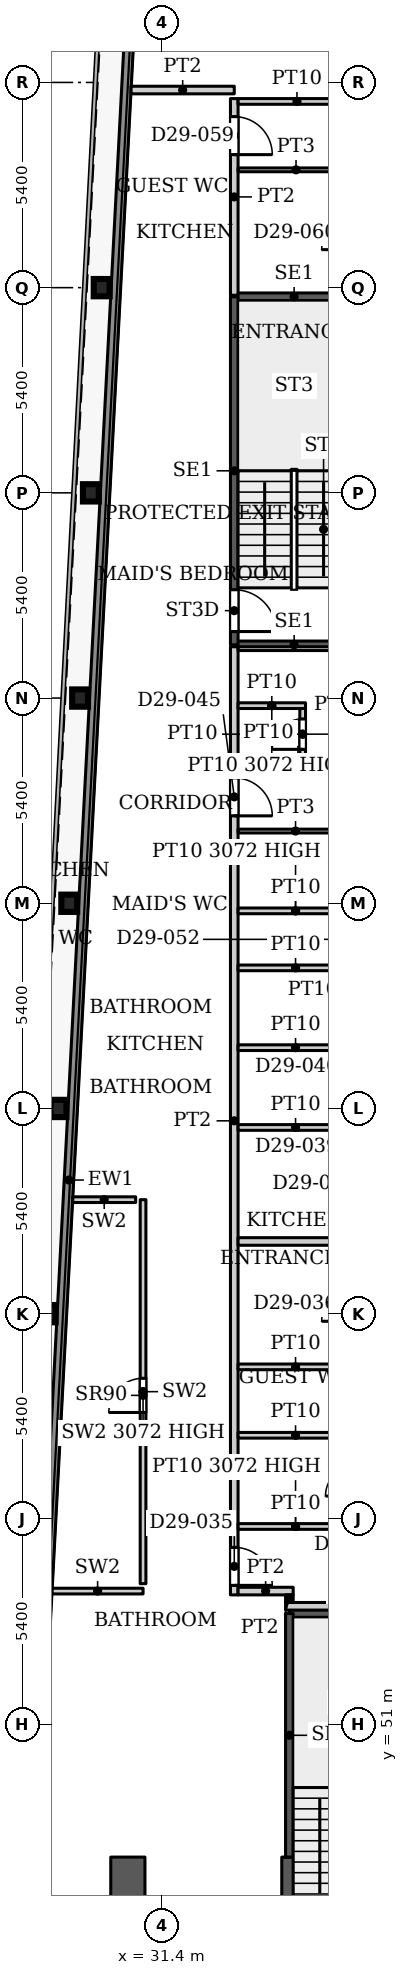
"""IFC4 building model, lengths in metres.
Left out: names, types, materials, properties, quantities, classifications, styles, units other than length and angle.
Written with IfcOpenShell. Run it as: python <this file> out.ifc"""

import sys

from ifc_helpers import new_model, si_unit, direction, frame, frame_2d, origin, origin_2d, place, context, subcontext, project, spatial, rectangle, i_section, extrude, source, transform, mapped, element, fill, save


model = new_model("IFC4")
c1 = context("Model", 3, precision=1e-05, world=origin(), true_north=direction((0.0, 1.0)))
c2 = subcontext(c1, "Body", "Model", "MODEL_VIEW")
j1 = project(units=[si_unit("LENGTHUNIT", "METRE"), si_unit("PLANEANGLEUNIT", "RADIAN")], contexts=[c1])
p1 = place(None, origin())
s1 = spatial("IfcSite", under=j1, at=p1, CompositionType="ELEMENT")
p2 = place(p1, origin())
s2 = spatial("IfcBuilding", under=s1, at=p2, CompositionType="ELEMENT")
p3 = place(p2, frame((0.0, 0.0, 125.3)))
s3 = spatial("IfcBuildingStorey", under=s2, at=p3, CompositionType="ELEMENT", Elevation=125.3)
for number, where, z_axis, x_axis in (
    (1, (28.39, 61.8, 0.0), (0.0, 0.0, 1.0), (1.0, 0.0, 0.0)),
    (2, (28.674, 67.2, 0.0), (0.0, 0.0, 1.0), (1.0, 0.0, 0.0)),
    (3, (28.958, 72.6, 0.0), (0.0, 0.0, 1.0), (1.0, 0.0, 0.0)),
    (4, (29.243, 78.0, 0.0), (0.0, 0.0, 1.0), (1.0, 0.0, 0.0)),
    (5, (29.527, 83.4, 0.0), (0.0, 0.0, 1.0), (1.0, 0.0, 0.0)),
    (6, (29.811, 88.8, 0.0), (0.0, 0.0, 1.0), (1.0, 0.0, 0.0)),
):
    element("IfcColumn", number, at=place(p3, frame(where, z_axis=z_axis, x_axis=x_axis)), inside=s3, PredefinedType="COLUMN", context=c2, shape_type="SweptSolid", body=[
        extrude(i_section(OverallWidth=0.418, OverallDepth=0.455, WebThickness=0.042, FlangeThickness=0.068, FilletRadius=0.014, at=origin_2d()), origin(), (0.0, 0.0, 1.0), 3.9),
    ])
p4 = place(p3, frame((34.75, 29.05, 0.0), z_axis=(0.0, 0.0, 1.0), x_axis=(0.0, 1.0, 0.0)))
e7 = element("IfcWall", 7, at=p4, inside=s3, PredefinedType="SHEAR", context=c2, shape_type="SweptSolid", body=[
    extrude(rectangle(XDim=18.45, YDim=0.4, at=frame_2d((9.225, 0.0))), origin(), (0.0, 0.0, 1.0), 3.9),
])
p5 = place(p4, frame((8.025, 0.0, 0.0)))
e8 = element("IfcOpeningElement", 8, at=p5, cuts=e7, PredefinedType="OPENING", context=c2, shape_type="SweptSolid", body=[
    extrude(rectangle(XDim=1.1, YDim=2.2, at=frame_2d((0.55, 1.1))), frame((0.0, 0.21, 0.0), z_axis=(0.0, -1.0, 0.0), x_axis=(1.0, 0.0, 0.0)), (0.0, 0.0, 1.0), 0.42),
])
p6 = place(p4, frame((10.875, 0.0, 0.0)))
e9 = element("IfcOpeningElement", 9, at=p6, cuts=e7, PredefinedType="OPENING", context=c2, shape_type="SweptSolid", body=[
    extrude(rectangle(XDim=1.1, YDim=2.2, at=frame_2d((0.55, 1.1))), frame((0.0, 0.21, 0.0), z_axis=(0.0, -1.0, 0.0), x_axis=(1.0, 0.0, 0.0)), (0.0, 0.0, 1.0), 0.42),
])
p7 = place(p4, frame((13.725, 0.0, 0.0)))
e10 = element("IfcOpeningElement", 10, at=p7, cuts=e7, PredefinedType="OPENING", context=c2, shape_type="SweptSolid", body=[
    extrude(rectangle(XDim=1.1, YDim=2.2, at=frame_2d((0.55, 1.1))), frame((0.0, 0.21, 0.0), z_axis=(0.0, -1.0, 0.0), x_axis=(1.0, 0.0, 0.0)), (0.0, 0.0, 1.0), 0.42),
])
p8 = place(p4, frame((15.95, 0.0, 0.0)))
e11 = element("IfcOpeningElement", 11, at=p8, cuts=e7, PredefinedType="OPENING", context=c2, shape_type="SweptSolid", body=[
    extrude(rectangle(XDim=1.1, YDim=2.2, at=frame_2d((0.55, 1.1))), frame((0.0, 0.21, 0.0), z_axis=(0.0, -1.0, 0.0), x_axis=(1.0, 0.0, 0.0)), (0.0, 0.0, 1.0), 0.42),
])
p9 = place(p3, frame((30.5, 29.05, 0.0), z_axis=(0.0, 0.0, 1.0), x_axis=(0.0, 1.0, 0.0)))
e12 = element("IfcWall", 12, at=p9, inside=s3, PredefinedType="SHEAR", context=c2, shape_type="SweptSolid", body=[
    extrude(rectangle(XDim=18.45, YDim=0.9, at=frame_2d((9.225, 0.0))), origin(), (0.0, 0.0, 1.0), 3.9),
])
p10 = place(p9, frame((6.55, 0.0, 0.0)))
e13 = element("IfcOpeningElement", 13, at=p10, cuts=e12, PredefinedType="OPENING", context=c2, shape_type="SweptSolid", body=[
    extrude(rectangle(XDim=0.9, YDim=2.2, at=frame_2d((0.45, 1.1))), frame((0.0, 0.46, 0.0), z_axis=(0.0, -1.0, 0.0), x_axis=(1.0, 0.0, 0.0)), (0.0, 0.0, 1.0), 0.92),
])
p11 = place(p9, frame((11.025, 0.0, 0.0)))
e14 = element("IfcOpeningElement", 14, at=p11, cuts=e12, PredefinedType="OPENING", context=c2, shape_type="SweptSolid", body=[
    extrude(rectangle(XDim=0.9, YDim=2.2, at=frame_2d((0.45, 1.1))), frame((0.0, 0.46, 0.0), z_axis=(0.0, -1.0, 0.0), x_axis=(1.0, 0.0, 0.0)), (0.0, 0.0, 1.0), 0.92),
])
p12 = place(p3, frame((27.195, 31.969, 0.0), z_axis=(0.0, 0.0, 1.0), x_axis=(0.052554995867, 0.998618031286, 0.0)))
e15 = element("IfcWall", 15, at=p12, inside=s3, PredefinedType="SOLIDWALL", context=c2, shape_type="SweptSolid", body=[
    extrude(rectangle(XDim=66.787, YDim=0.25, at=frame_2d((33.394, 0.0))), origin(), (0.0, 0.0, 1.0), 3.75),
])
p13 = place(p3, frame((34.75, 53.91, 0.0), z_axis=(0.0, 0.0, 1.0), x_axis=(1.0, 0.0, 0.0)))
e16 = element("IfcWall", 16, at=p13, inside=s3, PredefinedType="SHEAR", context=c2, shape_type="SweptSolid", body=[
    extrude(rectangle(XDim=3.15, YDim=0.2, at=frame_2d((1.575, 0.0))), origin(), (0.0, 0.0, 1.0), 3.9),
])
p14 = place(p3, frame((34.75, 47.5, 0.0), z_axis=(0.0, 0.0, 1.0), x_axis=(0.0, 1.0, 0.0)))
e17 = element("IfcWall", 17, at=p14, inside=s3, PredefinedType="SHEAR", context=c2, shape_type="SweptSolid", body=[
    extrude(rectangle(XDim=6.41, YDim=0.2, at=frame_2d((3.205, 0.0))), origin(), (0.0, 0.0, 1.0), 3.9),
])
for number, where, z_axis, x_axis in (
    (18, (33.3, 79.4, 0.0), (0.0, 0.0, 1.0), (1.0, 0.0, 0.0)),
    (19, (33.3, 88.56, 0.0), (0.0, 0.0, 1.0), (1.0, 0.0, 0.0)),
):
    element("IfcWall", number, at=place(p3, frame(where, z_axis=z_axis, x_axis=x_axis)), inside=s3, PredefinedType="SHEAR", context=c2, shape_type="SweptSolid", body=[
        extrude(rectangle(XDim=3.15, YDim=0.2, at=frame_2d((1.575, 0.0))), origin(), (0.0, 0.0, 1.0), 3.9),
    ])
p15 = place(p3, frame((33.3, 79.4, 0.0), z_axis=(0.0, 0.0, 1.0), x_axis=(0.0, 1.0, 0.0)))
e20 = element("IfcWall", 20, at=p15, inside=s3, PredefinedType="SHEAR", context=c2, shape_type="SweptSolid", body=[
    extrude(rectangle(XDim=9.16, YDim=0.2, at=frame_2d((4.58, 0.0))), origin(), (0.0, 0.0, 1.0), 3.9),
])
p16 = place(p15, frame((0.35, 0.0, 0.0)))
e21 = element("IfcOpeningElement", 21, at=p16, cuts=e20, PredefinedType="OPENING", context=c2, shape_type="SweptSolid", body=[
    extrude(rectangle(XDim=1.1, YDim=2.2, at=frame_2d((0.55, 1.1))), frame((0.0, 0.11, 0.0), z_axis=(0.0, -1.0, 0.0), x_axis=(1.0, 0.0, 0.0)), (0.0, 0.0, 1.0), 0.22),
])
p17 = place(p3, frame((28.508, 54.5, 0.0), z_axis=(0.0, 0.0, 1.0), x_axis=(1.0, 0.0, 0.0)))
e22 = element("IfcWall", 22, at=p17, inside=s3, PredefinedType="PARTITIONING", context=c2, shape_type="SweptSolid", body=[
    extrude(rectangle(XDim=2.392, YDim=0.15, at=frame_2d((1.196, 0.0))), origin(), (0.0, 0.0, 1.0), 3.9),
])
p18 = place(p3, frame((30.9, 54.695, 0.0), z_axis=(0.0, 0.0, 1.0), x_axis=(0.0, 1.0, 0.0)))
e23 = element("IfcWall", 23, at=p18, inside=s3, PredefinedType="PARTITIONING", context=c2, shape_type="SweptSolid", body=[
    extrude(rectangle(XDim=10.105, YDim=0.15, at=frame_2d((5.052, 0.0))), origin(), (0.0, 0.0, 1.0), 3.072),
])
p19 = place(p18, frame((4.505, 0.0, 0.0)))
e24 = element("IfcOpeningElement", 24, at=p19, cuts=e23, PredefinedType="OPENING", context=c2, shape_type="SweptSolid", body=[
    extrude(rectangle(XDim=0.9, YDim=2.2, at=frame_2d((0.45, 1.1))), frame((0.0, 0.085, 0.0), z_axis=(0.0, -1.0, 0.0), x_axis=(1.0, 0.0, 0.0)), (0.0, 0.0, 1.0), 0.17),
])
p20 = place(p3, frame((29.05, 64.8, 0.0), z_axis=(0.0, 0.0, 1.0), x_axis=(1.0, 0.0, 0.0)))
e25 = element("IfcWall", 25, at=p20, inside=s3, PredefinedType="PARTITIONING", context=c2, shape_type="SweptSolid", body=[
    extrude(rectangle(XDim=1.655, YDim=0.15, at=frame_2d((0.828, 0.0))), origin(), (0.0, 0.0, 1.0), 3.9),
])
p21 = place(p3, frame((30.585, 94.0, 0.0), z_axis=(0.0, 0.0, 1.0), x_axis=(1.0, 0.0, 0.0)))
e26 = element("IfcWall", 26, at=p21, inside=s3, PredefinedType="PARTITIONING", context=c2, shape_type="SweptSolid", body=[
    extrude(rectangle(XDim=2.715, YDim=0.2, at=frame_2d((1.358, 0.0))), origin(), (0.0, 0.0, 1.0), 3.6),
])
p22 = place(p3, frame((33.3, 54.4, 0.0), z_axis=(0.0, 0.0, 1.0), x_axis=(0.0, 1.0, 0.0)))
e27 = element("IfcWall", 27, at=p22, inside=s3, PredefinedType="PARTITIONING", context=c2, shape_type="SweptSolid", body=[
    extrude(rectangle(XDim=24.95, YDim=0.2, at=frame_2d((12.475, 0.0))), origin(), (0.0, 0.0, 1.0), 3.6),
])
p23 = place(p22, frame((0.25, 0.0, 0.0)))
e28 = element("IfcOpeningElement", 28, at=p23, cuts=e27, PredefinedType="OPENING", context=c2, shape_type="SweptSolid", body=[
    extrude(rectangle(XDim=1.0, YDim=2.1, at=frame_2d((0.5, 1.05))), frame((0.0, 0.11, 0.0), z_axis=(0.0, -1.0, 0.0), x_axis=(1.0, 0.0, 0.0)), (0.0, 0.0, 1.0), 0.22),
])
p24 = place(p22, frame((20.5, 0.0, 0.0)))
e29 = element("IfcOpeningElement", 29, at=p24, cuts=e27, PredefinedType="OPENING", context=c2, shape_type="SweptSolid", body=[
    extrude(rectangle(XDim=1.0, YDim=2.1, at=frame_2d((0.5, 1.05))), frame((0.0, 0.11, 0.0), z_axis=(0.0, -1.0, 0.0), x_axis=(1.0, 0.0, 0.0)), (0.0, 0.0, 1.0), 0.22),
])
p25 = place(p3, frame((33.3, 88.6, 0.0), z_axis=(0.0, 0.0, 1.0), x_axis=(0.0, 1.0, 0.0)))
e30 = element("IfcWall", 30, at=p25, inside=s3, PredefinedType="PARTITIONING", context=c2, shape_type="SweptSolid", body=[
    extrude(rectangle(XDim=5.175, YDim=0.2, at=frame_2d((2.587, 0.0))), origin(), (0.0, 0.0, 1.0), 3.6),
])
p26 = place(p25, frame((3.7, 0.0, 0.0)))
e31 = element("IfcOpeningElement", 31, at=p26, cuts=e30, PredefinedType="OPENING", context=c2, shape_type="SweptSolid", body=[
    extrude(rectangle(XDim=1.0, YDim=2.1, at=frame_2d((0.5, 1.05))), frame((0.0, 0.11, 0.0), z_axis=(0.0, -1.0, 0.0), x_axis=(1.0, 0.0, 0.0)), (0.0, 0.0, 1.0), 0.22),
])
p27 = place(p3, frame((33.4, 54.5, 0.0), z_axis=(0.0, 0.0, 1.0), x_axis=(1.0, 0.0, 0.0)))
e32 = element("IfcWall", 32, at=p27, inside=s3, PredefinedType="PARTITIONING", context=c2, shape_type="SweptSolid", body=[
    extrude(rectangle(XDim=1.45, YDim=0.2, at=frame_2d((0.725, 0.0))), origin(), (0.0, 0.0, 1.0), 3.6),
])
p28 = place(p3, frame((33.4, 56.2, 0.0), z_axis=(0.0, 0.0, 1.0), x_axis=(1.0, 0.0, 0.0)))
e33 = element("IfcWall", 33, at=p28, inside=s3, PredefinedType="PARTITIONING", context=c2, shape_type="SweptSolid", body=[
    extrude(rectangle(XDim=3.025, YDim=0.15, at=frame_2d((1.513, 0.0))), origin(), (0.0, 0.0, 1.0), 3.072),
])
for number, where, z_axis, x_axis in (
    (34, (33.4, 58.6, 0.0), (0.0, 0.0, 1.0), (1.0, 0.0, 0.0)),
    (35, (33.4, 60.4, 0.0), (0.0, 0.0, 1.0), (1.0, 0.0, 0.0)),
):
    element("IfcWall", number, at=place(p3, frame(where, z_axis=z_axis, x_axis=x_axis)), inside=s3, PredefinedType="PARTITIONING", context=c2, shape_type="SweptSolid", body=[
        extrude(rectangle(XDim=3.025, YDim=0.15, at=frame_2d((1.513, 0.0))), origin(), (0.0, 0.0, 1.0), 3.6),
    ])
p29 = place(p3, frame((33.4, 63.7, 0.0), z_axis=(0.0, 0.0, 1.0), x_axis=(1.0, 0.0, 0.0)))
e36 = element("IfcWall", 36, at=p29, inside=s3, PredefinedType="PARTITIONING", context=c2, shape_type="SweptSolid", body=[
    extrude(rectangle(XDim=12.5, YDim=0.2, at=frame_2d((6.25, 0.0))), origin(), (0.0, 0.0, 1.0), 3.6),
])
for number, where, z_axis, x_axis in (
    (37, (33.4, 66.7, 0.0), (0.0, 0.0, 1.0), (1.0, 0.0, 0.0)),
    (38, (33.4, 68.8, 0.0), (0.0, 0.0, 1.0), (1.0, 0.0, 0.0)),
    (39, (33.4, 70.9, 0.0), (0.0, 0.0, 1.0), (1.0, 0.0, 0.0)),
):
    element("IfcWall", number, at=place(p3, frame(where, z_axis=z_axis, x_axis=x_axis)), inside=s3, PredefinedType="PARTITIONING", context=c2, shape_type="SweptSolid", body=[
        extrude(rectangle(XDim=3.025, YDim=0.15, at=frame_2d((1.513, 0.0))), origin(), (0.0, 0.0, 1.0), 3.6),
    ])
p30 = place(p3, frame((33.4, 72.4, 0.0), z_axis=(0.0, 0.0, 1.0), x_axis=(1.0, 0.0, 0.0)))
e40 = element("IfcWall", 40, at=p30, inside=s3, PredefinedType="PARTITIONING", context=c2, shape_type="SweptSolid", body=[
    extrude(rectangle(XDim=3.025, YDim=0.15, at=frame_2d((1.513, 0.0))), origin(), (0.0, 0.0, 1.0), 3.072),
])
p31 = place(p3, frame((33.4, 74.5, 0.0), z_axis=(0.0, 0.0, 1.0), x_axis=(1.0, 0.0, 0.0)))
e41 = element("IfcWall", 41, at=p31, inside=s3, PredefinedType="PARTITIONING", context=c2, shape_type="SweptSolid", body=[
    extrude(rectangle(XDim=3.025, YDim=0.1, at=frame_2d((1.513, 0.0))), origin(), (0.0, 0.0, 1.0), 3.6),
])
p32 = place(p3, frame((33.4, 76.3, 0.0), z_axis=(0.0, 0.0, 1.0), x_axis=(1.0, 0.0, 0.0)))
e42 = element("IfcWall", 42, at=p32, inside=s3, PredefinedType="PARTITIONING", context=c2, shape_type="SweptSolid", body=[
    extrude(rectangle(XDim=3.15, YDim=0.15, at=frame_2d((1.575, 0.0))), origin(), (0.0, 0.0, 1.0), 3.6),
])
p33 = place(p3, frame((33.4, 77.8, 0.0), z_axis=(0.0, 0.0, 1.0), x_axis=(1.0, 0.0, 0.0)))
e43 = element("IfcWall", 43, at=p33, inside=s3, PredefinedType="PARTITIONING", context=c2, shape_type="SweptSolid", body=[
    extrude(rectangle(XDim=1.775, YDim=0.15, at=frame_2d((0.888, 0.0))), origin(), (0.0, 0.0, 1.0), 3.072),
])
p34 = place(p3, frame((33.4, 79.3, 0.0), z_axis=(0.0, 0.0, 1.0), x_axis=(1.0, 0.0, 0.0)))
e44 = element("IfcWall", 44, at=p34, inside=s3, PredefinedType="PARTITIONING", context=c2, shape_type="SweptSolid", body=[
    extrude(rectangle(XDim=12.5, YDim=0.1, at=frame_2d((6.25, 0.0))), origin(), (0.0, 0.0, 1.0), 3.6),
])
p35 = place(p34, frame((3.35, 0.0, 0.0)))
e45 = element("IfcOpeningElement", 45, at=p35, cuts=e44, PredefinedType="OPENING", context=c2, shape_type="SweptSolid", body=[
    extrude(rectangle(XDim=0.9, YDim=2.1, at=frame_2d((0.45, 1.05))), frame((0.0, 0.06, 0.0), z_axis=(0.0, -1.0, 0.0), x_axis=(1.0, 0.0, 0.0)), (0.0, 0.0, 1.0), 0.12),
])
p36 = place(p3, frame((33.4, 91.9, 0.0), z_axis=(0.0, 0.0, 1.0), x_axis=(1.0, 0.0, 0.0)))
e46 = element("IfcWall", 46, at=p36, inside=s3, PredefinedType="PARTITIONING", context=c2, shape_type="SweptSolid", body=[
    extrude(rectangle(XDim=3.05, YDim=0.1, at=frame_2d((1.525, 0.0))), origin(), (0.0, 0.0, 1.0), 3.6),
])
p37 = place(p3, frame((33.4, 93.7, 0.0), z_axis=(0.0, 0.0, 1.0), x_axis=(1.0, 0.0, 0.0)))
e47 = element("IfcWall", 47, at=p37, inside=s3, PredefinedType="PARTITIONING", context=c2, shape_type="SweptSolid", body=[
    extrude(rectangle(XDim=3.1, YDim=0.15, at=frame_2d((1.55, 0.0))), origin(), (0.0, 0.0, 1.0), 3.6),
])
p38 = place(p3, frame((34.65, 54.1, 0.0), z_axis=(0.0, 0.0, 1.0), x_axis=(1.0, 0.0, 0.0)))
e48 = element("IfcWall", 48, at=p38, inside=s3, PredefinedType="PARTITIONING", context=c2, shape_type="SweptSolid", body=[
    extrude(rectangle(XDim=11.25, YDim=0.2, at=frame_2d((5.625, 0.0))), origin(), (0.0, 0.0, 1.0), 3.6),
])
p39 = place(p3, frame((34.75, 54.2, 0.0), z_axis=(0.0, 0.0, 1.0), x_axis=(0.0, 1.0, 0.0)))
e49 = element("IfcWall", 49, at=p39, inside=s3, PredefinedType="PARTITIONING", context=c2, shape_type="SweptSolid", body=[
    extrude(rectangle(XDim=0.2, YDim=0.2, at=frame_2d((0.1, 0.0))), origin(), (0.0, 0.0, 1.0), 3.6),
])
p40 = place(p3, frame((35.1, 76.375, 0.0), z_axis=(0.0, 0.0, 1.0), x_axis=(0.0, 1.0, 0.0)))
e50 = element("IfcWall", 50, at=p40, inside=s3, PredefinedType="PARTITIONING", context=c2, shape_type="SweptSolid", body=[
    extrude(rectangle(XDim=1.35, YDim=0.15, at=frame_2d((0.675, 0.0))), origin(), (0.0, 0.0, 1.0), 3.6),
])
p41 = place(p40, frame((0.275, 0.0, 0.0)))
e51 = element("IfcOpeningElement", 51, at=p41, cuts=e50, PredefinedType="OPENING", context=c2, shape_type="SweptSolid", body=[
    extrude(rectangle(XDim=0.8, YDim=2.1, at=frame_2d((0.4, 1.05))), frame((0.0, 0.085, 0.0), z_axis=(0.0, -1.0, 0.0), x_axis=(1.0, 0.0, 0.0)), (0.0, 0.0, 1.0), 0.17),
])
m1 = source(origin(), c2, "Body", "SweptSolid", [
    extrude(rectangle(XDim=0.9, YDim=2.2, at=frame_2d((0.45, 1.1))), frame((0.0, 0.025, 0.0), z_axis=(0.0, -1.0, 0.0), x_axis=(1.0, 0.0, 0.0)), (0.0, 0.0, 1.0), 0.05),
])
p42 = place(p19, origin())
e52 = element("IfcDoor", 52, at=p42, inside=s3, OperationType="SINGLE_SWING_LEFT", PredefinedType="DOOR", context=c2, shape_type="MappedRepresentation", body=[
    mapped(m1, transform((0.0, 0.0, 0.0), x_axis=(1.0, 0.0, 0.0), y_axis=(0.0, 1.0, 0.0), z_axis=(0.0, 0.0, 1.0), scale=1.0)),
])
fill(e24, e52)
m2 = source(origin(), c2, "Body", "SweptSolid", [
    extrude(rectangle(XDim=1.1, YDim=2.2, at=frame_2d((0.55, 1.1))), frame((0.0, 0.025, 0.0), z_axis=(0.0, -1.0, 0.0), x_axis=(1.0, 0.0, 0.0)), (0.0, 0.0, 1.0), 0.05),
])
p43 = place(p16, origin())
e53 = element("IfcDoor", 53, at=p43, inside=s3, OperationType="SINGLE_SWING_RIGHT", PredefinedType="DOOR", context=c2, shape_type="MappedRepresentation", body=[
    mapped(m2, transform((0.0, 0.0, 0.0), x_axis=(1.0, 0.0, 0.0), y_axis=(0.0, 1.0, 0.0), z_axis=(0.0, 0.0, 1.0), scale=1.0)),
])
fill(e21, e53)
m3 = source(origin(), c2, "Body", "SweptSolid", [
    extrude(rectangle(XDim=1.0, YDim=2.1, at=frame_2d((0.5, 1.05))), frame((0.0, 0.025, 0.0), z_axis=(0.0, -1.0, 0.0), x_axis=(1.0, 0.0, 0.0)), (0.0, 0.0, 1.0), 0.05),
])
p44 = place(p23, origin())
e54 = element("IfcDoor", 54, at=p44, inside=s3, OperationType="SINGLE_SWING_RIGHT", PredefinedType="DOOR", context=c2, shape_type="MappedRepresentation", body=[
    mapped(m3, transform((0.0, 0.0, 0.0), x_axis=(1.0, 0.0, 0.0), y_axis=(0.0, 1.0, 0.0), z_axis=(0.0, 0.0, 1.0), scale=1.0)),
])
fill(e28, e54)
p45 = place(p24, origin())
e55 = element("IfcDoor", 55, at=p45, inside=s3, OperationType="SINGLE_SWING_RIGHT", PredefinedType="DOOR", context=c2, shape_type="MappedRepresentation", body=[
    mapped(m3, transform((0.0, 0.0, 0.0), x_axis=(1.0, 0.0, 0.0), y_axis=(0.0, 1.0, 0.0), z_axis=(0.0, 0.0, 1.0), scale=1.0)),
])
fill(e29, e55)
m4 = source(origin(), c2, "Body", "SweptSolid", [
    extrude(rectangle(XDim=0.8, YDim=2.1, at=frame_2d((0.4, 1.05))), frame((0.0, 0.025, 0.0), z_axis=(0.0, -1.0, 0.0), x_axis=(1.0, 0.0, 0.0)), (0.0, 0.0, 1.0), 0.05),
])
p46 = place(p41, origin())
e56 = element("IfcDoor", 56, at=p46, inside=s3, OperationType="SINGLE_SWING_LEFT", PredefinedType="DOOR", context=c2, shape_type="MappedRepresentation", body=[
    mapped(m4, transform((0.0, 0.0, 0.0), x_axis=(1.0, 0.0, 0.0), y_axis=(0.0, 1.0, 0.0), z_axis=(0.0, 0.0, 1.0), scale=1.0)),
])
fill(e51, e56)
p47 = place(p26, origin())
e57 = element("IfcDoor", 57, at=p47, inside=s3, OperationType="SINGLE_SWING_RIGHT", PredefinedType="DOOR", context=c2, shape_type="MappedRepresentation", body=[
    mapped(m3, transform((0.0, 0.0, 0.0), x_axis=(1.0, 0.0, 0.0), y_axis=(0.0, 1.0, 0.0), z_axis=(0.0, 0.0, 1.0), scale=1.0)),
])
fill(e31, e57)
save(model, sys.argv[1])
